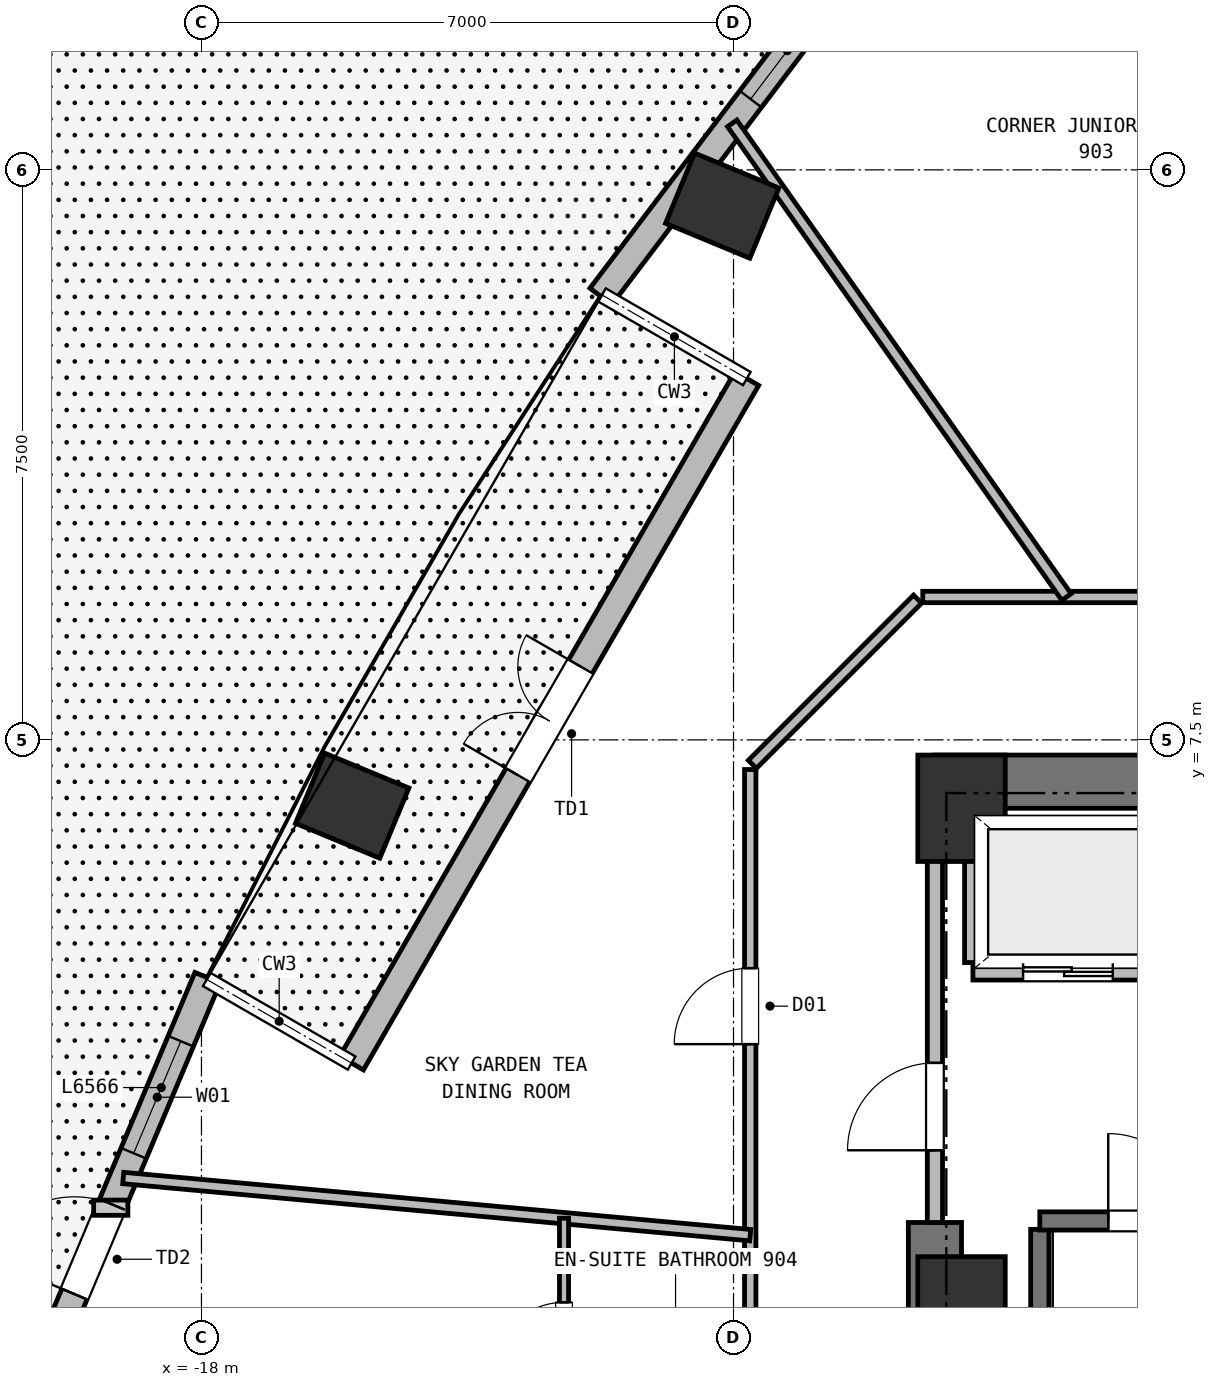
"""IFC4 building model, lengths in metres.
Left out: names, types, materials, properties, quantities, classifications, styles, units other than length and angle.
Written with IfcOpenShell. Run it as: python <this file> out.ifc"""

import sys

from ifc_helpers import new_model, si_unit, direction, frame, frame_2d, origin, origin_2d, place, context, subcontext, project, spatial, rectangle, extrude, element, fill, save


model = new_model("IFC4")
c1 = context("Model", 3, precision=1e-05, world=origin(), true_north=direction((0.0, 1.0)))
c2 = subcontext(c1, "Body", "Model", "MODEL_VIEW")
j1 = project(units=[si_unit("LENGTHUNIT", "METRE"), si_unit("PLANEANGLEUNIT", "RADIAN")], contexts=[c1])
p1 = place(None, origin())
s1 = spatial("IfcSite", under=j1, at=p1, CompositionType="ELEMENT")
p2 = place(p1, origin())
s2 = spatial("IfcBuilding", under=s1, at=p2, CompositionType="ELEMENT")
p3 = place(p2, frame((0.0, 0.0, 30.5)))
s3 = spatial("IfcBuildingStorey", under=s2, at=p3, CompositionType="ELEMENT", Elevation=30.5)
for number, where, z_axis, x_axis in (
    (1, (-8.0, 6.6, 0.0), (0.0, 0.0, 1.0), (1.0, 0.0, 0.0)),
    (2, (-8.0, 0.0, 0.0), (0.0, 0.0, 1.0), (1.0, 0.0, 0.0)),
):
    element("IfcColumn", number, at=place(p3, frame(where, z_axis=z_axis, x_axis=x_axis)), inside=s3, PredefinedType="COLUMN", context=c2, shape_type="SweptSolid", body=[
        extrude(rectangle(XDim=1.15, YDim=1.4, at=origin_2d()), origin(), (0.0, 0.0, 1.0), 3.75),
    ])
p4 = place(p3, frame((-8.35, 6.95, 0.0), z_axis=(0.0, 0.0, 1.0), x_axis=(1.0, 0.0, 0.0)))
e3 = element("IfcWall", 3, at=p4, inside=s3, PredefinedType="SHEAR", context=c2, shape_type="SweptSolid", body=[
    extrude(rectangle(XDim=16.7, YDim=0.7, at=frame_2d((8.35, 0.0))), origin(), (0.0, 0.0, 1.0), 3.5),
])
p5 = place(p3, frame((-8.35, -6.95, 0.0), z_axis=(0.0, 0.0, 1.0), x_axis=(0.0, 1.0, 0.0)))
e4 = element("IfcWall", 4, at=p5, inside=s3, PredefinedType="SHEAR", context=c2, shape_type="SweptSolid", body=[
    extrude(rectangle(XDim=8.1, YDim=0.7, at=frame_2d((4.05, 0.0))), origin(), (0.0, 0.0, 1.0), 3.5),
])
for number, where, z_axis, x_axis in (
    (5, (-11.148, 14.529, 0.0), (0.0, 0.0, 1.0), (0.383, 0.924, 0.0)),
    (6, (-16.017, 6.635, 0.0), (0.0, 0.0, 1.0), (0.383, 0.924, 0.0)),
):
    element("IfcColumn", number, at=place(p3, frame(where, z_axis=z_axis, x_axis=x_axis)), inside=s3, PredefinedType="COLUMN", context=c2, shape_type="SweptSolid", body=[
        extrude(rectangle(XDim=1.0, YDim=1.2, at=origin_2d()), origin(), (0.0, 0.0, 1.0), 3.75),
    ])
p6 = place(p3, frame((-16.025, 3.248, 0.0), z_axis=(0.0, 0.0, 1.0), x_axis=(0.499999493275, 0.866025696342, 0.0)))
e7 = element("IfcWall", 7, at=p6, inside=s3, PredefinedType="SOLIDWALL", context=c2, shape_type="SweptSolid", body=[
    extrude(rectangle(XDim=10.4, YDim=0.36, at=frame_2d((5.2, 0.0))), origin(), (0.0, 0.0, 1.0), 3.5),
])
p7 = place(p6, frame((4.375, 0.0, 0.0)))
e8 = element("IfcOpeningElement", 8, at=p7, cuts=e7, PredefinedType="OPENING", context=c2, shape_type="SweptSolid", body=[
    extrude(rectangle(XDim=1.65, YDim=2.25, at=frame_2d((0.825, 1.125))), frame((0.0, 0.19, 0.0), z_axis=(0.0, -1.0, 0.0), x_axis=(1.0, 0.0, 0.0)), (0.0, 0.0, 1.0), 0.38),
])
p8 = place(p3, frame((-12.745, 13.334, 0.0), z_axis=(0.0, 0.0, 1.0), x_axis=(0.604405198851, 0.796677071091, 0.0)))
e9 = element("IfcWall", 9, at=p8, inside=s3, PredefinedType="SOLIDWALL", context=c2, shape_type="SweptSolid", body=[
    extrude(rectangle(XDim=6.566, YDim=0.36, at=frame_2d((3.283, 0.0))), origin(), (0.0, 0.0, 1.0), 2.93),
])
p9 = place(p8, frame((3.26, 0.0, 0.72)))
e10 = element("IfcOpeningElement", 10, at=p9, cuts=e9, PredefinedType="OPENING", context=c2, shape_type="SweptSolid", body=[
    extrude(rectangle(XDim=1.6, YDim=1.88, at=frame_2d((0.8, 0.94))), frame((0.0, 0.19, 0.0), z_axis=(0.0, -1.0, 0.0), x_axis=(1.0, 0.0, 0.0)), (0.0, 0.0, 1.0), 0.38),
])
p10 = place(p3, frame((-20.466, -1.682, 0.0), z_axis=(0.0, 0.0, 1.0), x_axis=(0.387744465456, 0.921766906277, 0.0)))
e11 = element("IfcWall", 11, at=p10, inside=s3, PredefinedType="SOLIDWALL", context=c2, shape_type="SweptSolid", body=[
    extrude(rectangle(XDim=6.566, YDim=0.36, at=frame_2d((3.283, 0.0))), origin(), (0.0, 0.0, 1.0), 3.5),
])
p11 = place(p10, frame((2.05, 0.0, 0.0)))
e12 = element("IfcOpeningElement", 12, at=p11, cuts=e11, PredefinedType="OPENING", context=c2, shape_type="SweptSolid", body=[
    extrude(rectangle(XDim=1.28, YDim=2.2, at=frame_2d((0.64, 1.1))), frame((0.0, 0.19, 0.0), z_axis=(0.0, -1.0, 0.0), x_axis=(1.0, 0.0, 0.0)), (0.0, 0.0, 1.0), 0.38),
])
p12 = place(p10, frame((4.06, 0.0, 0.72)))
e13 = element("IfcOpeningElement", 13, at=p12, cuts=e11, PredefinedType="OPENING", context=c2, shape_type="SweptSolid", body=[
    extrude(rectangle(XDim=1.6, YDim=1.88, at=frame_2d((0.8, 0.94))), frame((0.0, 0.19, 0.0), z_axis=(0.0, -1.0, 0.0), x_axis=(1.0, 0.0, 0.0)), (0.0, 0.0, 1.0), 0.38),
])
p13 = place(p3, frame((-6.97, -6.16, 0.0), z_axis=(0.0, 0.0, 1.0), x_axis=(0.0, 1.0, 0.0)))
e14 = element("IfcWall", 14, at=p13, inside=s3, PredefinedType="SHEAR", context=c2, shape_type="SweptSolid", body=[
    extrude(rectangle(XDim=7.22, YDim=0.24, at=frame_2d((3.61, 0.0))), origin(), (0.0, 0.0, 1.0), 3.5),
])
p14 = place(p3, frame((-6.97, 1.17, 0.0), z_axis=(0.0, 0.0, 1.0), x_axis=(1.0, 0.0, 0.0)))
e15 = element("IfcWall", 15, at=p14, inside=s3, PredefinedType="SHEAR", context=c2, shape_type="SweptSolid", body=[
    extrude(rectangle(XDim=2.96, YDim=0.24, at=frame_2d((1.48, 0.0))), origin(), (0.0, 0.0, 1.0), 3.5),
])
p15 = place(p14, frame((0.9, 0.0, 0.0)))
e16 = element("IfcOpeningElement", 16, at=p15, cuts=e15, PredefinedType="OPENING", context=c2, shape_type="SweptSolid", body=[
    extrude(rectangle(XDim=1.15, YDim=2.15, at=frame_2d((0.575, 1.075))), frame((0.0, 0.13, 0.0), z_axis=(0.0, -1.0, 0.0), x_axis=(1.0, 0.0, 0.0)), (0.0, 0.0, 1.0), 0.26),
])
p16 = place(p3, frame((-7.85, 4.45, 0.0), z_axis=(0.0, 0.0, 1.0), x_axis=(1.0, 0.0, 0.0)))
e17 = element("IfcWall", 17, at=p16, inside=s3, PredefinedType="PARTITIONING", context=c2, shape_type="SweptSolid", body=[
    extrude(rectangle(XDim=2.5, YDim=0.22, at=frame_2d((1.25, 0.0))), origin(), (0.0, 0.0, 1.0), 3.5),
])
p17 = place(p16, frame((0.66, 0.0, 0.0)))
e18 = element("IfcOpeningElement", 18, at=p17, cuts=e17, PredefinedType="OPENING", context=c2, shape_type="SweptSolid", body=[
    extrude(rectangle(XDim=1.18, YDim=2.15, at=frame_2d((0.59, 1.075))), frame((0.0, 0.12, 0.0), z_axis=(0.0, -1.0, 0.0), x_axis=(1.0, 0.0, 0.0)), (0.0, 0.0, 1.0), 0.24),
])
p18 = place(p3, frame((-7.85, 4.57, 0.0), z_axis=(0.0, 0.0, 1.0), x_axis=(0.0, 1.0, 0.0)))
e19 = element("IfcWall", 19, at=p18, inside=s3, PredefinedType="PARTITIONING", context=c2, shape_type="SweptSolid", body=[
    extrude(rectangle(XDim=2.03, YDim=0.22, at=frame_2d((1.015, 0.0))), origin(), (0.0, 0.0, 1.0), 3.08),
])
p19 = place(p3, frame((-8.35, 1.15, 0.0), z_axis=(0.0, 0.0, 1.0), x_axis=(0.0, 1.0, 0.0)))
e20 = element("IfcWall", 20, at=p19, inside=s3, PredefinedType="PARTITIONING", context=c2, shape_type="SweptSolid", body=[
    extrude(rectangle(XDim=5.4, YDim=0.2, at=frame_2d((2.7, 0.0))), origin(), (0.0, 0.0, 1.0), 3.5),
])
p20 = place(p19, frame((0.95, 0.0, 0.0)))
e21 = element("IfcOpeningElement", 21, at=p20, cuts=e20, PredefinedType="OPENING", context=c2, shape_type="SweptSolid", body=[
    extrude(rectangle(XDim=1.15, YDim=2.15, at=frame_2d((0.575, 1.075))), frame((0.0, 0.11, 0.0), z_axis=(0.0, -1.0, 0.0), x_axis=(1.0, 0.0, 0.0)), (0.0, 0.0, 1.0), 0.22),
])
p21 = place(p3, frame((-8.51, 9.38, 0.0), z_axis=(0.0, 0.0, 1.0), x_axis=(1.0, 0.0, 0.0)))
e22 = element("IfcWall", 22, at=p21, inside=s3, PredefinedType="PARTITIONING", context=c2, shape_type="SweptSolid", body=[
    extrude(rectangle(XDim=17.02, YDim=0.15, at=frame_2d((8.51, 0.0))), origin(), (0.0, 0.0, 1.0), 3.5),
])
p22 = place(p21, frame((13.545, 0.0, 0.0)))
e23 = element("IfcOpeningElement", 23, at=p22, cuts=e22, PredefinedType="OPENING", context=c2, shape_type="SweptSolid", body=[
    extrude(rectangle(XDim=1.0, YDim=2.15, at=frame_2d((0.5, 1.075))), frame((0.0, 0.085, 0.0), z_axis=(0.0, -1.0, 0.0), x_axis=(1.0, 0.0, 0.0)), (0.0, 0.0, 1.0), 0.17),
])
p23 = place(p21, frame((3.095, 0.0, 0.0)))
e24 = element("IfcOpeningElement", 24, at=p23, cuts=e22, PredefinedType="OPENING", context=c2, shape_type="SweptSolid", body=[
    extrude(rectangle(XDim=1.06, YDim=2.15, at=frame_2d((0.53, 1.075))), frame((0.0, 0.085, 0.0), z_axis=(0.0, -1.0, 0.0), x_axis=(1.0, 0.0, 0.0)), (0.0, 0.0, 1.0), 0.17),
])
p24 = place(p21, frame((8.402, 0.0, 0.0)))
e25 = element("IfcOpeningElement", 25, at=p24, cuts=e22, PredefinedType="OPENING", context=c2, shape_type="SweptSolid", body=[
    extrude(rectangle(XDim=1.06, YDim=2.15, at=frame_2d((0.53, 1.075))), frame((0.0, 0.085, 0.0), z_axis=(0.0, -1.0, 0.0), x_axis=(1.0, 0.0, 0.0)), (0.0, 0.0, 1.0), 0.17),
])
p25 = place(p3, frame((-10.752, 7.178, 0.0), z_axis=(0.0, 0.0, 1.0), x_axis=(0.707067066127, 0.707146494016, 0.0)))
e26 = element("IfcWall", 26, at=p25, inside=s3, PredefinedType="PARTITIONING", context=c2, shape_type="SweptSolid", body=[
    extrude(rectangle(XDim=3.074, YDim=0.15, at=frame_2d((1.537, 0.0))), origin(), (0.0, 0.0, 1.0), 3.5),
])
p26 = place(p3, frame((-10.78, -7.11, 0.0), z_axis=(0.0, 0.0, 1.0), x_axis=(0.0, 1.0, 0.0)))
e27 = element("IfcWall", 27, at=p26, inside=s3, PredefinedType="PARTITIONING", context=c2, shape_type="SweptSolid", body=[
    extrude(rectangle(XDim=14.22, YDim=0.15, at=frame_2d((7.11, 0.0))), origin(), (0.0, 0.0, 1.0), 3.12),
])
p27 = place(p26, frame((10.606, 0.0, 0.0)))
e28 = element("IfcOpeningElement", 28, at=p27, cuts=e27, PredefinedType="OPENING", context=c2, shape_type="SweptSolid", body=[
    extrude(rectangle(XDim=1.0, YDim=2.15, at=frame_2d((0.5, 1.075))), frame((0.0, 0.085, 0.0), z_axis=(0.0, -1.0, 0.0), x_axis=(1.0, 0.0, 0.0)), (0.0, 0.0, 1.0), 0.17),
])
p28 = place(p26, frame((3.57, 0.0, 0.0)))
e29 = element("IfcOpeningElement", 29, at=p28, cuts=e27, PredefinedType="OPENING", context=c2, shape_type="SweptSolid", body=[
    extrude(rectangle(XDim=1.06, YDim=2.15, at=frame_2d((0.53, 1.075))), frame((0.0, 0.085, 0.0), z_axis=(0.0, -1.0, 0.0), x_axis=(1.0, 0.0, 0.0)), (0.0, 0.0, 1.0), 0.17),
])
p29 = place(p3, frame((-6.619, 9.38, 0.0), z_axis=(0.0, 0.0, 1.0), x_axis=(-0.576560044714, 0.817054780807, 0.0)))
e30 = element("IfcWall", 30, at=p29, inside=s3, PredefinedType="PARTITIONING", context=c2, shape_type="SweptSolid", body=[
    extrude(rectangle(XDim=7.628, YDim=0.15, at=frame_2d((3.814, 0.0))), origin(), (0.0, 0.0, 1.0), 3.5),
])
p30 = place(p3, frame((-10.78, 0.983, 0.0), z_axis=(0.0, 0.0, 1.0), x_axis=(-0.995868528088, 0.090806799107, 0.0)))
e31 = element("IfcWall", 31, at=p30, inside=s3, PredefinedType="PARTITIONING", context=c2, shape_type="SweptSolid", body=[
    extrude(rectangle(XDim=8.283, YDim=0.15, at=frame_2d((4.142, 0.0))), origin(), (0.0, 0.0, 1.0), 3.5),
])
p31 = place(p3, frame((-13.23, -1.928, 0.0), z_axis=(0.0, 0.0, 1.0), x_axis=(0.0, 1.0, 0.0)))
e32 = element("IfcWall", 32, at=p31, inside=s3, PredefinedType="PARTITIONING", context=c2, shape_type="SweptSolid", body=[
    extrude(rectangle(XDim=3.134, YDim=0.12, at=frame_2d((1.567, 0.0))), origin(), (0.0, 0.0, 1.0), 3.12),
])
p32 = place(p31, frame((1.107, 0.0, 0.0)))
e33 = element("IfcOpeningElement", 33, at=p32, cuts=e32, PredefinedType="OPENING", context=c2, shape_type="SweptSolid", body=[
    extrude(rectangle(XDim=0.92, YDim=2.1, at=frame_2d((0.46, 1.05))), frame((0.0, 0.07, 0.0), z_axis=(0.0, -1.0, 0.0), x_axis=(1.0, 0.0, 0.0)), (0.0, 0.0, 1.0), 0.14),
])
p33 = place(p7, origin())
e34 = element("IfcDoor", 34, at=p33, inside=s3, OperationType="DOUBLE_DOOR_SINGLE_SWING", PredefinedType="DOOR", context=c2, shape_type="SweptSolid", body=[
    extrude(rectangle(XDim=1.65, YDim=2.25, at=frame_2d((0.825, 1.125))), frame((0.0, 0.025, 0.0), z_axis=(0.0, -1.0, 0.0), x_axis=(1.0, 0.0, 0.0)), (0.0, 0.0, 1.0), 0.05),
])
fill(e8, e34)
p34 = place(p9, origin())
e35 = element("IfcWindow", 35, at=p34, inside=s3, PartitioningType="SINGLE_PANEL", PredefinedType="WINDOW", context=c2, shape_type="SweptSolid", body=[
    extrude(rectangle(XDim=1.6, YDim=1.88, at=frame_2d((0.8, 0.94))), frame((0.0, 0.03, 0.0), z_axis=(0.0, -1.0, 0.0), x_axis=(1.0, 0.0, 0.0)), (0.0, 0.0, 1.0), 0.06),
])
fill(e10, e35)
p35 = place(p11, origin())
e36 = element("IfcDoor", 36, at=p35, inside=s3, OperationType="SINGLE_SWING_LEFT", PredefinedType="DOOR", context=c2, shape_type="SweptSolid", body=[
    extrude(rectangle(XDim=1.28, YDim=2.2, at=frame_2d((0.64, 1.1))), frame((0.0, 0.025, 0.0), z_axis=(0.0, -1.0, 0.0), x_axis=(1.0, 0.0, 0.0)), (0.0, 0.0, 1.0), 0.05),
])
fill(e12, e36)
p36 = place(p12, origin())
e37 = element("IfcWindow", 37, at=p36, inside=s3, PartitioningType="SINGLE_PANEL", PredefinedType="WINDOW", context=c2, shape_type="SweptSolid", body=[
    extrude(rectangle(XDim=1.6, YDim=1.88, at=frame_2d((0.8, 0.94))), frame((0.0, 0.03, 0.0), z_axis=(0.0, -1.0, 0.0), x_axis=(1.0, 0.0, 0.0)), (0.0, 0.0, 1.0), 0.06),
])
fill(e13, e37)
p37 = place(p15, origin())
e38 = element("IfcDoor", 38, at=p37, inside=s3, OperationType="SINGLE_SWING_LEFT", PredefinedType="DOOR", context=c2, shape_type="SweptSolid", body=[
    extrude(rectangle(XDim=1.15, YDim=2.15, at=frame_2d((0.575, 1.075))), frame((0.0, 0.025, 0.0), z_axis=(0.0, -1.0, 0.0), x_axis=(1.0, 0.0, 0.0)), (0.0, 0.0, 1.0), 0.05),
])
fill(e16, e38)
p38 = place(p17, origin())
e39 = element("IfcDoor", 39, at=p38, inside=s3, OperationType="DOUBLE_DOOR_SLIDING", PredefinedType="DOOR", context=c2, shape_type="SweptSolid", body=[
    extrude(rectangle(XDim=1.18, YDim=2.15, at=frame_2d((0.59, 1.075))), frame((0.0, 0.025, 0.0), z_axis=(0.0, -1.0, 0.0), x_axis=(1.0, 0.0, 0.0)), (0.0, 0.0, 1.0), 0.05),
])
fill(e18, e39)
p39 = place(p20, origin())
e40 = element("IfcDoor", 40, at=p39, inside=s3, OperationType="SINGLE_SWING_LEFT", PredefinedType="DOOR", context=c2, shape_type="SweptSolid", body=[
    extrude(rectangle(XDim=1.15, YDim=2.15, at=frame_2d((0.575, 1.075))), frame((0.0, 0.025, 0.0), z_axis=(0.0, -1.0, 0.0), x_axis=(1.0, 0.0, 0.0)), (0.0, 0.0, 1.0), 0.05),
])
fill(e21, e40)
p40 = place(p32, origin())
e41 = element("IfcDoor", 41, at=p40, inside=s3, OperationType="SINGLE_SWING_LEFT", PredefinedType="DOOR", context=c2, shape_type="SweptSolid", body=[
    extrude(rectangle(XDim=0.92, YDim=2.1, at=frame_2d((0.46, 1.05))), frame((0.0, 0.025, 0.0), z_axis=(0.0, -1.0, 0.0), x_axis=(1.0, 0.0, 0.0)), (0.0, 0.0, 1.0), 0.05),
])
fill(e33, e41)
p41 = place(p27, origin())
e42 = element("IfcDoor", 42, at=p41, inside=s3, OperationType="SINGLE_SWING_LEFT", PredefinedType="DOOR", context=c2, shape_type="SweptSolid", body=[
    extrude(rectangle(XDim=1.0, YDim=2.15, at=frame_2d((0.5, 1.075))), frame((0.0, 0.025, 0.0), z_axis=(0.0, -1.0, 0.0), x_axis=(1.0, 0.0, 0.0)), (0.0, 0.0, 1.0), 0.05),
])
fill(e28, e42)
save(model, sys.argv[1])
